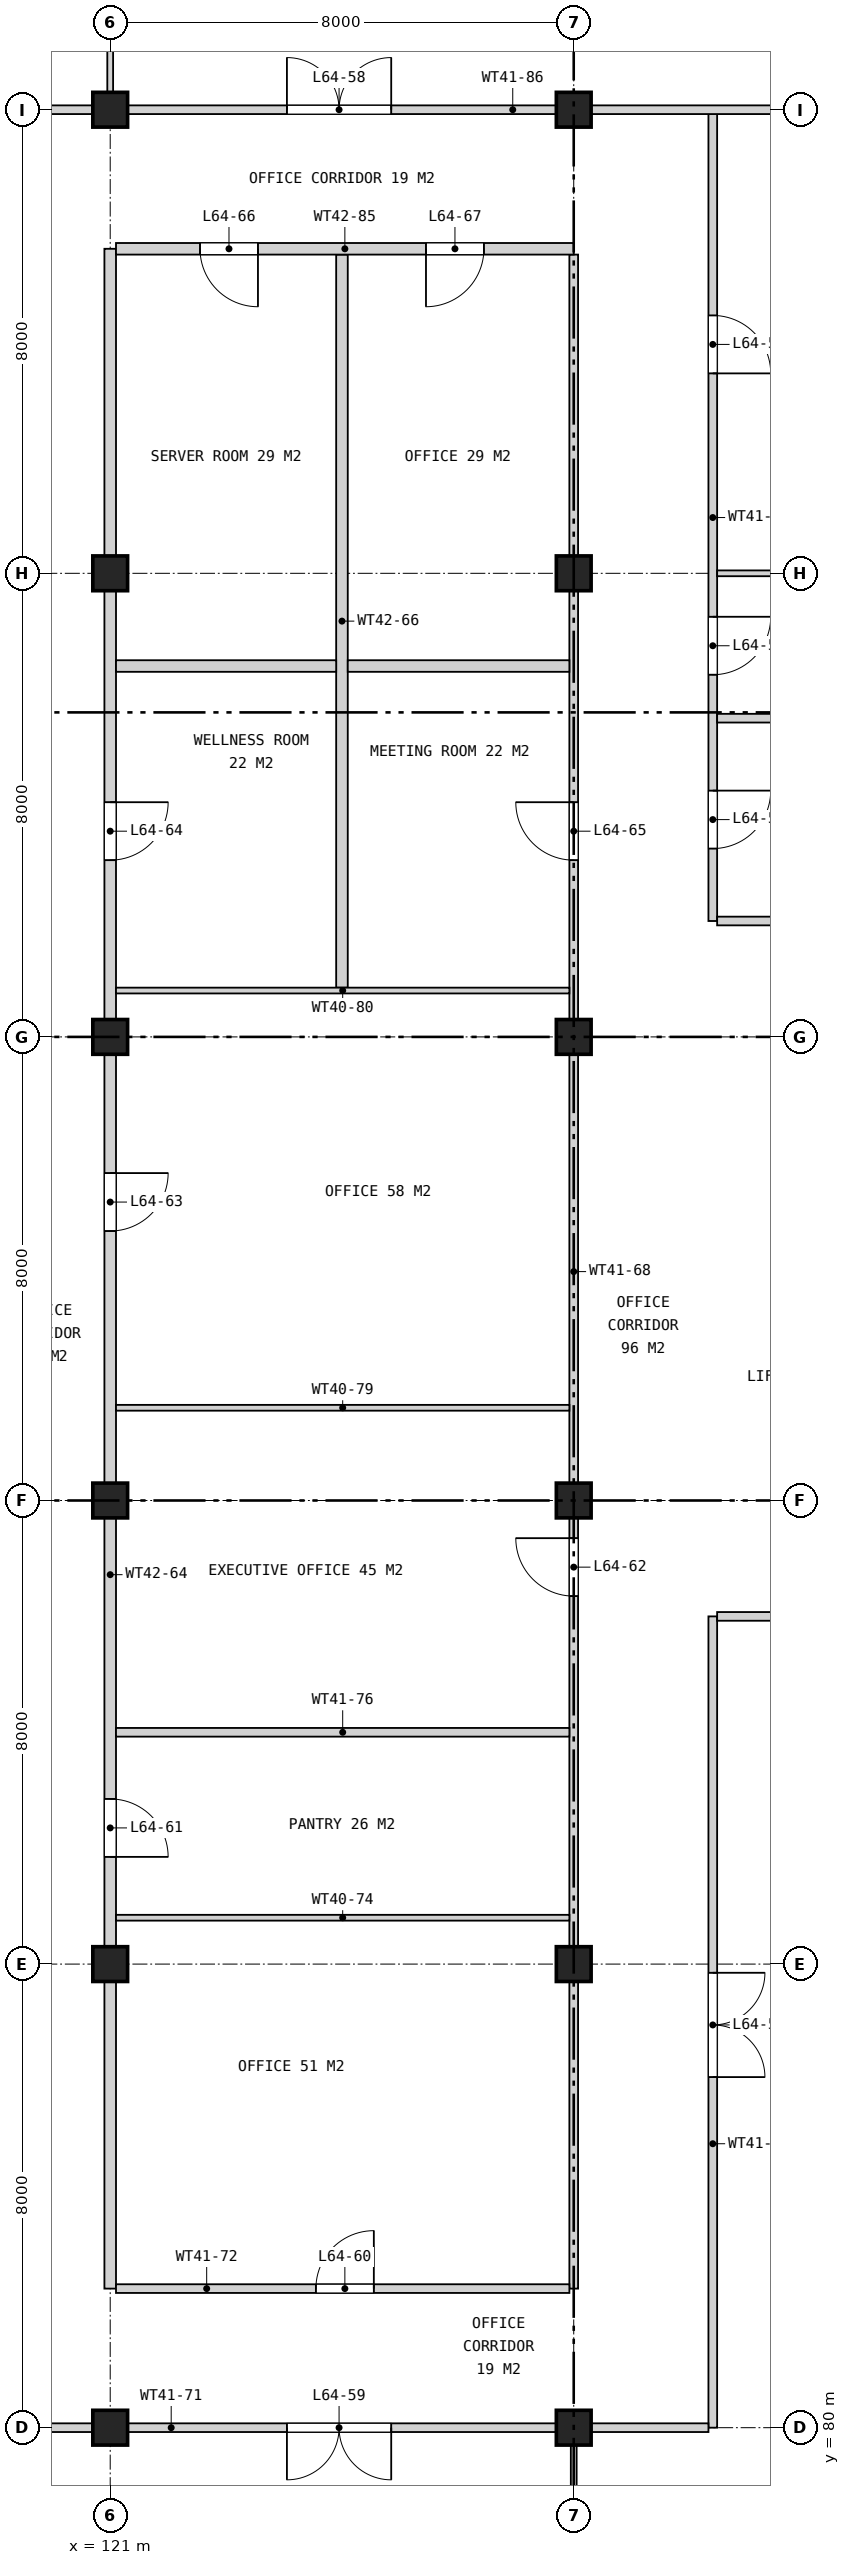
"""IFC4 building model, lengths in metres.
Left out: names, types, materials, properties, quantities, classifications, styles, units other than length and angle.
Written with IfcOpenShell. Run it as: python <this file> out.ifc"""

import sys

from ifc_helpers import new_model, si_unit, direction, frame, frame_2d, origin, origin_2d, place, context, subcontext, project, spatial, rectangle, extrude, element, fill, save


model = new_model("IFC4")
c1 = context("Model", 3, precision=1e-05, world=origin(), true_north=direction((0.0, 1.0)))
c2 = subcontext(c1, "Body", "Model", "MODEL_VIEW")
j1 = project(units=[si_unit("LENGTHUNIT", "METRE"), si_unit("PLANEANGLEUNIT", "RADIAN")], contexts=[c1])
p1 = place(None, origin())
s1 = spatial("IfcSite", under=j1, at=p1, CompositionType="ELEMENT")
p2 = place(p1, origin())
s2 = spatial("IfcBuilding", under=s1, at=p2, CompositionType="ELEMENT")
p3 = place(p2, frame((0.0, 0.0, 295.5)))
s3 = spatial("IfcBuildingStorey", under=s2, at=p3, CompositionType="ELEMENT", Elevation=295.5)
for number, where, z_axis, x_axis in (
    (1, (121.0, 80.0, 0.0), (0.0, 0.0, 1.0), (1.0, 0.0, 0.0)),
    (2, (121.0, 88.0, 0.0), (0.0, 0.0, 1.0), (1.0, 0.0, 0.0)),
    (3, (121.0, 96.0, 0.0), (0.0, 0.0, 1.0), (1.0, 0.0, 0.0)),
    (4, (121.0, 104.0, 0.0), (0.0, 0.0, 1.0), (1.0, 0.0, 0.0)),
    (5, (121.0, 112.0, 0.0), (0.0, 0.0, 1.0), (1.0, 0.0, 0.0)),
    (6, (121.0, 120.0, 0.0), (0.0, 0.0, 1.0), (1.0, 0.0, 0.0)),
    (7, (129.0, 80.0, 0.0), (0.0, 0.0, 1.0), (1.0, 0.0, 0.0)),
    (8, (129.0, 88.0, 0.0), (0.0, 0.0, 1.0), (1.0, 0.0, 0.0)),
    (9, (129.0, 96.0, 0.0), (0.0, 0.0, 1.0), (1.0, 0.0, 0.0)),
    (10, (129.0, 104.0, 0.0), (0.0, 0.0, 1.0), (1.0, 0.0, 0.0)),
    (11, (129.0, 112.0, 0.0), (0.0, 0.0, 1.0), (1.0, 0.0, 0.0)),
    (12, (129.0, 120.0, 0.0), (0.0, 0.0, 1.0), (1.0, 0.0, 0.0)),
):
    element("IfcColumn", number, at=place(p3, frame(where, z_axis=z_axis, x_axis=x_axis)), inside=s3, PredefinedType="COLUMN", context=c2, shape_type="SweptSolid", body=[
        extrude(rectangle(XDim=0.6, YDim=0.6, at=origin_2d()), origin(), (0.0, 0.0, 1.0), 4.2),
    ])
p4 = place(p3, frame((121.0, 82.4, 0.0), z_axis=(0.0, 0.0, 1.0), x_axis=(0.0, 1.0, 0.0)))
e13 = element("IfcWall", 13, at=p4, inside=s3, PredefinedType="SOLIDWALL", context=c2, shape_type="SweptSolid", body=[
    extrude(rectangle(XDim=35.2, YDim=0.2, at=frame_2d((17.6, 0.0))), origin(), (0.0, 0.0, 1.0), 3.443),
])
p5 = place(p4, frame((7.45, 0.0, 0.0)))
e14 = element("IfcOpeningElement", 14, at=p5, cuts=e13, PredefinedType="OPENING", context=c2, shape_type="SweptSolid", body=[
    extrude(rectangle(XDim=1.0, YDim=2.1, at=frame_2d((0.5, 1.05))), frame((0.0, 0.11, 0.0), z_axis=(0.0, -1.0, 0.0), x_axis=(1.0, 0.0, 0.0)), (0.0, 0.0, 1.0), 0.22),
])
p6 = place(p4, frame((18.25, 0.0, 0.0)))
e15 = element("IfcOpeningElement", 15, at=p6, cuts=e13, PredefinedType="OPENING", context=c2, shape_type="SweptSolid", body=[
    extrude(rectangle(XDim=1.0, YDim=2.1, at=frame_2d((0.5, 1.05))), frame((0.0, 0.11, 0.0), z_axis=(0.0, -1.0, 0.0), x_axis=(1.0, 0.0, 0.0)), (0.0, 0.0, 1.0), 0.22),
])
p7 = place(p4, frame((24.65, 0.0, 0.0)))
e16 = element("IfcOpeningElement", 16, at=p7, cuts=e13, PredefinedType="OPENING", context=c2, shape_type="SweptSolid", body=[
    extrude(rectangle(XDim=1.0, YDim=2.1, at=frame_2d((0.5, 1.05))), frame((0.0, 0.11, 0.0), z_axis=(0.0, -1.0, 0.0), x_axis=(1.0, 0.0, 0.0)), (0.0, 0.0, 1.0), 0.22),
])
p8 = place(p3, frame((121.0, 120.075, 0.0), z_axis=(0.0, 0.0, 1.0), x_axis=(0.0, 1.0, 0.0)))
e17 = element("IfcWall", 17, at=p8, inside=s3, PredefinedType="PARTITIONING", context=c2, shape_type="SweptSolid", body=[
    extrude(rectangle(XDim=8.145, YDim=0.1, at=frame_2d((4.073, 0.0))), origin(), (0.0, 0.0, 1.0), 3.443),
])
p9 = place(p3, frame((125.0, 104.85, 0.0), z_axis=(0.0, 0.0, 1.0), x_axis=(0.0, 1.0, 0.0)))
e18 = element("IfcWall", 18, at=p9, inside=s3, PredefinedType="SOLIDWALL", context=c2, shape_type="SweptSolid", body=[
    extrude(rectangle(XDim=12.65, YDim=0.2, at=frame_2d((6.325, 0.0))), origin(), (0.0, 0.0, 1.0), 3.443),
])
p10 = place(p3, frame((129.0, 71.78, 0.0), z_axis=(0.0, 0.0, 1.0), x_axis=(0.0, 1.0, 0.0)))
e19 = element("IfcWall", 19, at=p10, inside=s3, PredefinedType="PARTITIONING", context=c2, shape_type="SweptSolid", body=[
    extrude(rectangle(XDim=8.145, YDim=0.1, at=frame_2d((4.073, 0.0))), origin(), (0.0, 0.0, 1.0), 3.443),
])
p11 = place(p3, frame((129.0, 82.4, 0.0), z_axis=(0.0, 0.0, 1.0), x_axis=(0.0, 1.0, 0.0)))
e20 = element("IfcWall", 20, at=p11, inside=s3, PredefinedType="PARTITIONING", context=c2, shape_type="SweptSolid", body=[
    extrude(rectangle(XDim=35.1, YDim=0.15, at=frame_2d((17.55, 0.0))), origin(), (0.0, 0.0, 1.0), 3.443),
])
p12 = place(p11, frame((11.95, 0.0, 0.0)))
e21 = element("IfcOpeningElement", 21, at=p12, cuts=e20, PredefinedType="OPENING", context=c2, shape_type="SweptSolid", body=[
    extrude(rectangle(XDim=1.0, YDim=2.1, at=frame_2d((0.5, 1.05))), frame((0.0, 0.085, 0.0), z_axis=(0.0, -1.0, 0.0), x_axis=(1.0, 0.0, 0.0)), (0.0, 0.0, 1.0), 0.17),
])
p13 = place(p11, frame((24.65, 0.0, 0.0)))
e22 = element("IfcOpeningElement", 22, at=p13, cuts=e20, PredefinedType="OPENING", context=c2, shape_type="SweptSolid", body=[
    extrude(rectangle(XDim=1.0, YDim=2.1, at=frame_2d((0.5, 1.05))), frame((0.0, 0.085, 0.0), z_axis=(0.0, -1.0, 0.0), x_axis=(1.0, 0.0, 0.0)), (0.0, 0.0, 1.0), 0.17),
])
p14 = place(p3, frame((131.4, 80.0, 0.0), z_axis=(0.0, 0.0, 1.0), x_axis=(0.0, 1.0, 0.0)))
e23 = element("IfcWall", 23, at=p14, inside=s3, PredefinedType="PARTITIONING", context=c2, shape_type="SweptSolid", body=[
    extrude(rectangle(XDim=14.0, YDim=0.15, at=frame_2d((7.0, 0.0))), origin(), (0.0, 0.0, 1.0), 3.443),
])
p15 = place(p14, frame((6.05, 0.0, 0.0)))
e24 = element("IfcOpeningElement", 24, at=p15, cuts=e23, PredefinedType="OPENING", context=c2, shape_type="SweptSolid", body=[
    extrude(rectangle(XDim=1.8, YDim=2.1, at=frame_2d((0.9, 1.05))), frame((0.0, 0.085, 0.0), z_axis=(0.0, -1.0, 0.0), x_axis=(1.0, 0.0, 0.0)), (0.0, 0.0, 1.0), 0.17),
])
p16 = place(p3, frame((131.4, 106.0, 0.0), z_axis=(0.0, 0.0, 1.0), x_axis=(0.0, 1.0, 0.0)))
e25 = element("IfcWall", 25, at=p16, inside=s3, PredefinedType="PARTITIONING", context=c2, shape_type="SweptSolid", body=[
    extrude(rectangle(XDim=13.925, YDim=0.15, at=frame_2d((6.962, 0.0))), origin(), (0.0, 0.0, 1.0), 3.443),
])
p17 = place(p16, frame((1.25, 0.0, 0.0)))
e26 = element("IfcOpeningElement", 26, at=p17, cuts=e25, PredefinedType="OPENING", context=c2, shape_type="SweptSolid", body=[
    extrude(rectangle(XDim=1.0, YDim=2.1, at=frame_2d((0.5, 1.05))), frame((0.0, 0.085, 0.0), z_axis=(0.0, -1.0, 0.0), x_axis=(1.0, 0.0, 0.0)), (0.0, 0.0, 1.0), 0.17),
])
p18 = place(p16, frame((4.25, 0.0, 0.0)))
e27 = element("IfcOpeningElement", 27, at=p18, cuts=e25, PredefinedType="OPENING", context=c2, shape_type="SweptSolid", body=[
    extrude(rectangle(XDim=1.0, YDim=2.1, at=frame_2d((0.5, 1.05))), frame((0.0, 0.085, 0.0), z_axis=(0.0, -1.0, 0.0), x_axis=(1.0, 0.0, 0.0)), (0.0, 0.0, 1.0), 0.17),
])
p19 = place(p16, frame((9.45, 0.0, 0.0)))
e28 = element("IfcOpeningElement", 28, at=p19, cuts=e25, PredefinedType="OPENING", context=c2, shape_type="SweptSolid", body=[
    extrude(rectangle(XDim=1.0, YDim=2.1, at=frame_2d((0.5, 1.05))), frame((0.0, 0.085, 0.0), z_axis=(0.0, -1.0, 0.0), x_axis=(1.0, 0.0, 0.0)), (0.0, 0.0, 1.0), 0.17),
])
p20 = place(p3, frame((112.78, 80.0, 0.0), z_axis=(0.0, 0.0, 1.0), x_axis=(1.0, 0.0, 0.0)))
e29 = element("IfcWall", 29, at=p20, inside=s3, PredefinedType="PARTITIONING", context=c2, shape_type="SweptSolid", body=[
    extrude(rectangle(XDim=18.545, YDim=0.15, at=frame_2d((9.272, 0.0))), origin(), (0.0, 0.0, 1.0), 3.443),
])
p21 = place(p20, frame((11.27, 0.0, 0.0)))
e30 = element("IfcOpeningElement", 30, at=p21, cuts=e29, PredefinedType="OPENING", context=c2, shape_type="SweptSolid", body=[
    extrude(rectangle(XDim=1.8, YDim=2.1, at=frame_2d((0.9, 1.05))), frame((0.0, 0.085, 0.0), z_axis=(0.0, -1.0, 0.0), x_axis=(1.0, 0.0, 0.0)), (0.0, 0.0, 1.0), 0.17),
])
p22 = place(p3, frame((121.1, 82.4, 0.0), z_axis=(0.0, 0.0, 1.0), x_axis=(1.0, 0.0, 0.0)))
e31 = element("IfcWall", 31, at=p22, inside=s3, PredefinedType="PARTITIONING", context=c2, shape_type="SweptSolid", body=[
    extrude(rectangle(XDim=7.825, YDim=0.15, at=frame_2d((3.913, 0.0))), origin(), (0.0, 0.0, 1.0), 3.443),
])
p23 = place(p22, frame((3.45, 0.0, 0.0)))
e32 = element("IfcOpeningElement", 32, at=p23, cuts=e31, PredefinedType="OPENING", context=c2, shape_type="SweptSolid", body=[
    extrude(rectangle(XDim=1.0, YDim=2.1, at=frame_2d((0.5, 1.05))), frame((0.0, 0.085, 0.0), z_axis=(0.0, -1.0, 0.0), x_axis=(1.0, 0.0, 0.0)), (0.0, 0.0, 1.0), 0.17),
])
p24 = place(p3, frame((121.1, 88.8, 0.0), z_axis=(0.0, 0.0, 1.0), x_axis=(1.0, 0.0, 0.0)))
e33 = element("IfcWall", 33, at=p24, inside=s3, PredefinedType="PARTITIONING", context=c2, shape_type="SweptSolid", body=[
    extrude(rectangle(XDim=7.825, YDim=0.1, at=frame_2d((3.913, 0.0))), origin(), (0.0, 0.0, 1.0), 3.443),
])
p25 = place(p3, frame((121.1, 92.0, 0.0), z_axis=(0.0, 0.0, 1.0), x_axis=(1.0, 0.0, 0.0)))
e34 = element("IfcWall", 34, at=p25, inside=s3, PredefinedType="PARTITIONING", context=c2, shape_type="SweptSolid", body=[
    extrude(rectangle(XDim=7.825, YDim=0.15, at=frame_2d((3.913, 0.0))), origin(), (0.0, 0.0, 1.0), 3.443),
])
p26 = place(p3, frame((131.475, 94.0, 0.0), z_axis=(0.0, 0.0, 1.0), x_axis=(1.0, 0.0, 0.0)))
e35 = element("IfcWall", 35, at=p26, inside=s3, PredefinedType="PARTITIONING", context=c2, shape_type="SweptSolid", body=[
    extrude(rectangle(XDim=5.525, YDim=0.15, at=frame_2d((2.762, 0.0))), origin(), (0.0, 0.0, 1.0), 3.443),
])
for number, where, z_axis, x_axis in (
    (36, (121.1, 97.6, 0.0), (0.0, 0.0, 1.0), (1.0, 0.0, 0.0)),
    (37, (121.1, 104.8, 0.0), (0.0, 0.0, 1.0), (1.0, 0.0, 0.0)),
):
    element("IfcWall", number, at=place(p3, frame(where, z_axis=z_axis, x_axis=x_axis)), inside=s3, PredefinedType="PARTITIONING", context=c2, shape_type="SweptSolid", body=[
        extrude(rectangle(XDim=7.825, YDim=0.1, at=frame_2d((3.913, 0.0))), origin(), (0.0, 0.0, 1.0), 3.443),
    ])
for number, where, z_axis, x_axis in (
    (38, (131.475, 106.0, 0.0), (0.0, 0.0, 1.0), (1.0, 0.0, 0.0)),
    (39, (131.475, 109.5, 0.0), (0.0, 0.0, 1.0), (1.0, 0.0, 0.0)),
):
    element("IfcWall", number, at=place(p3, frame(where, z_axis=z_axis, x_axis=x_axis)), inside=s3, PredefinedType="PARTITIONING", context=c2, shape_type="SweptSolid", body=[
        extrude(rectangle(XDim=5.525, YDim=0.15, at=frame_2d((2.762, 0.0))), origin(), (0.0, 0.0, 1.0), 3.443),
    ])
p27 = place(p3, frame((131.475, 112.0, 0.0), z_axis=(0.0, 0.0, 1.0), x_axis=(1.0, 0.0, 0.0)))
e40 = element("IfcWall", 40, at=p27, inside=s3, PredefinedType="PARTITIONING", context=c2, shape_type="SweptSolid", body=[
    extrude(rectangle(XDim=5.525, YDim=0.1, at=frame_2d((2.762, 0.0))), origin(), (0.0, 0.0, 1.0), 3.443),
])
p28 = place(p3, frame((121.1, 117.6, 0.0), z_axis=(0.0, 0.0, 1.0), x_axis=(1.0, 0.0, 0.0)))
e41 = element("IfcWall", 41, at=p28, inside=s3, PredefinedType="SOLIDWALL", context=c2, shape_type="SweptSolid", body=[
    extrude(rectangle(XDim=7.9, YDim=0.2, at=frame_2d((3.95, 0.0))), origin(), (0.0, 0.0, 1.0), 3.443),
])
p29 = place(p28, frame((1.45, 0.0, 0.0)))
e42 = element("IfcOpeningElement", 42, at=p29, cuts=e41, PredefinedType="OPENING", context=c2, shape_type="SweptSolid", body=[
    extrude(rectangle(XDim=1.0, YDim=2.1, at=frame_2d((0.5, 1.05))), frame((0.0, 0.11, 0.0), z_axis=(0.0, -1.0, 0.0), x_axis=(1.0, 0.0, 0.0)), (0.0, 0.0, 1.0), 0.22),
])
p30 = place(p28, frame((5.35, 0.0, 0.0)))
e43 = element("IfcOpeningElement", 43, at=p30, cuts=e41, PredefinedType="OPENING", context=c2, shape_type="SweptSolid", body=[
    extrude(rectangle(XDim=1.0, YDim=2.1, at=frame_2d((0.5, 1.05))), frame((0.0, 0.11, 0.0), z_axis=(0.0, -1.0, 0.0), x_axis=(1.0, 0.0, 0.0)), (0.0, 0.0, 1.0), 0.22),
])
p31 = place(p3, frame((118.675, 120.0, 0.0), z_axis=(0.0, 0.0, 1.0), x_axis=(1.0, 0.0, 0.0)))
e44 = element("IfcWall", 44, at=p31, inside=s3, PredefinedType="PARTITIONING", context=c2, shape_type="SweptSolid", body=[
    extrude(rectangle(XDim=18.545, YDim=0.15, at=frame_2d((9.272, 0.0))), origin(), (0.0, 0.0, 1.0), 3.443),
])
p32 = place(p31, frame((5.375, 0.0, 0.0)))
e45 = element("IfcOpeningElement", 45, at=p32, cuts=e44, PredefinedType="OPENING", context=c2, shape_type="SweptSolid", body=[
    extrude(rectangle(XDim=1.8, YDim=2.1, at=frame_2d((0.9, 1.05))), frame((0.0, 0.085, 0.0), z_axis=(0.0, -1.0, 0.0), x_axis=(1.0, 0.0, 0.0)), (0.0, 0.0, 1.0), 0.17),
])
p33 = place(p3, frame((121.1, 110.4, 0.0), z_axis=(0.0, 0.0, 1.0), x_axis=(1.0, 0.0, 0.0)))
e46 = element("IfcWall", 46, at=p33, inside=s3, PredefinedType="SOLIDWALL", context=c2, shape_type="SweptSolid", body=[
    extrude(rectangle(XDim=3.8, YDim=0.2, at=frame_2d((1.9, 0.0))), origin(), (0.0, 0.0, 1.0), 3.443),
])
p34 = place(p3, frame((125.1, 110.4, 0.0), z_axis=(0.0, 0.0, 1.0), x_axis=(1.0, 0.0, 0.0)))
e47 = element("IfcWall", 47, at=p34, inside=s3, PredefinedType="SOLIDWALL", context=c2, shape_type="SweptSolid", body=[
    extrude(rectangle(XDim=3.825, YDim=0.2, at=frame_2d((1.913, 0.0))), origin(), (0.0, 0.0, 1.0), 3.443),
])
p35 = place(p17, frame((1.0, 0.0, 0.0), z_axis=(0.0, 0.0, 1.0), x_axis=(-1.0, 0.0, 0.0)))
e48 = element("IfcDoor", 48, at=p35, inside=s3, OperationType="SINGLE_SWING_LEFT", PredefinedType="DOOR", context=c2, shape_type="SweptSolid", body=[
    extrude(rectangle(XDim=1.0, YDim=2.1, at=frame_2d((0.5, 1.05))), frame((0.0, 0.025, 0.0), z_axis=(0.0, -1.0, 0.0), x_axis=(1.0, 0.0, 0.0)), (0.0, 0.0, 1.0), 0.05),
])
fill(e26, e48)
p36 = place(p18, frame((1.0, 0.0, 0.0), z_axis=(0.0, 0.0, 1.0), x_axis=(-1.0, 0.0, 0.0)))
e49 = element("IfcDoor", 49, at=p36, inside=s3, OperationType="SINGLE_SWING_LEFT", PredefinedType="DOOR", context=c2, shape_type="SweptSolid", body=[
    extrude(rectangle(XDim=1.0, YDim=2.1, at=frame_2d((0.5, 1.05))), frame((0.0, 0.025, 0.0), z_axis=(0.0, -1.0, 0.0), x_axis=(1.0, 0.0, 0.0)), (0.0, 0.0, 1.0), 0.05),
])
fill(e27, e49)
p37 = place(p19, frame((1.0, 0.0, 0.0), z_axis=(0.0, 0.0, 1.0), x_axis=(-1.0, 0.0, 0.0)))
e50 = element("IfcDoor", 50, at=p37, inside=s3, OperationType="SINGLE_SWING_RIGHT", PredefinedType="DOOR", context=c2, shape_type="SweptSolid", body=[
    extrude(rectangle(XDim=1.0, YDim=2.1, at=frame_2d((0.5, 1.05))), frame((0.0, 0.025, 0.0), z_axis=(0.0, -1.0, 0.0), x_axis=(1.0, 0.0, 0.0)), (0.0, 0.0, 1.0), 0.05),
])
fill(e28, e50)
p38 = place(p15, frame((1.8, 0.0, 0.0), z_axis=(0.0, 0.0, 1.0), x_axis=(-1.0, 0.0, 0.0)))
e51 = element("IfcDoor", 51, at=p38, inside=s3, OperationType="DOUBLE_DOOR_SINGLE_SWING", PredefinedType="DOOR", context=c2, shape_type="SweptSolid", body=[
    extrude(rectangle(XDim=1.8, YDim=2.1, at=frame_2d((0.9, 1.05))), frame((0.0, 0.025, 0.0), z_axis=(0.0, -1.0, 0.0), x_axis=(1.0, 0.0, 0.0)), (0.0, 0.0, 1.0), 0.05),
])
fill(e24, e51)
p39 = place(p32, origin())
e52 = element("IfcDoor", 52, at=p39, inside=s3, OperationType="DOUBLE_DOOR_SINGLE_SWING", PredefinedType="DOOR", context=c2, shape_type="SweptSolid", body=[
    extrude(rectangle(XDim=1.8, YDim=2.1, at=frame_2d((0.9, 1.05))), frame((0.0, 0.025, 0.0), z_axis=(0.0, -1.0, 0.0), x_axis=(1.0, 0.0, 0.0)), (0.0, 0.0, 1.0), 0.05),
])
fill(e45, e52)
p40 = place(p21, frame((1.8, 0.0, 0.0), z_axis=(0.0, 0.0, 1.0), x_axis=(-1.0, 0.0, 0.0)))
e53 = element("IfcDoor", 53, at=p40, inside=s3, OperationType="DOUBLE_DOOR_SINGLE_SWING", PredefinedType="DOOR", context=c2, shape_type="SweptSolid", body=[
    extrude(rectangle(XDim=1.8, YDim=2.1, at=frame_2d((0.9, 1.05))), frame((0.0, 0.025, 0.0), z_axis=(0.0, -1.0, 0.0), x_axis=(1.0, 0.0, 0.0)), (0.0, 0.0, 1.0), 0.05),
])
fill(e30, e53)
p41 = place(p23, origin())
e54 = element("IfcDoor", 54, at=p41, inside=s3, OperationType="SINGLE_SWING_RIGHT", PredefinedType="DOOR", context=c2, shape_type="SweptSolid", body=[
    extrude(rectangle(XDim=1.0, YDim=2.1, at=frame_2d((0.5, 1.05))), frame((0.0, 0.025, 0.0), z_axis=(0.0, -1.0, 0.0), x_axis=(1.0, 0.0, 0.0)), (0.0, 0.0, 1.0), 0.05),
])
fill(e32, e54)
p42 = place(p5, frame((1.0, 0.0, 0.0), z_axis=(0.0, 0.0, 1.0), x_axis=(-1.0, 0.0, 0.0)))
e55 = element("IfcDoor", 55, at=p42, inside=s3, OperationType="SINGLE_SWING_RIGHT", PredefinedType="DOOR", context=c2, shape_type="SweptSolid", body=[
    extrude(rectangle(XDim=1.0, YDim=2.1, at=frame_2d((0.5, 1.05))), frame((0.0, 0.025, 0.0), z_axis=(0.0, -1.0, 0.0), x_axis=(1.0, 0.0, 0.0)), (0.0, 0.0, 1.0), 0.05),
])
fill(e14, e55)
p43 = place(p12, origin())
e56 = element("IfcDoor", 56, at=p43, inside=s3, OperationType="SINGLE_SWING_RIGHT", PredefinedType="DOOR", context=c2, shape_type="SweptSolid", body=[
    extrude(rectangle(XDim=1.0, YDim=2.1, at=frame_2d((0.5, 1.05))), frame((0.0, 0.025, 0.0), z_axis=(0.0, -1.0, 0.0), x_axis=(1.0, 0.0, 0.0)), (0.0, 0.0, 1.0), 0.05),
])
fill(e21, e56)
p44 = place(p6, frame((1.0, 0.0, 0.0), z_axis=(0.0, 0.0, 1.0), x_axis=(-1.0, 0.0, 0.0)))
e57 = element("IfcDoor", 57, at=p44, inside=s3, OperationType="SINGLE_SWING_LEFT", PredefinedType="DOOR", context=c2, shape_type="SweptSolid", body=[
    extrude(rectangle(XDim=1.0, YDim=2.1, at=frame_2d((0.5, 1.05))), frame((0.0, 0.025, 0.0), z_axis=(0.0, -1.0, 0.0), x_axis=(1.0, 0.0, 0.0)), (0.0, 0.0, 1.0), 0.05),
])
fill(e15, e57)
p45 = place(p7, frame((1.0, 0.0, 0.0), z_axis=(0.0, 0.0, 1.0), x_axis=(-1.0, 0.0, 0.0)))
e58 = element("IfcDoor", 58, at=p45, inside=s3, OperationType="SINGLE_SWING_LEFT", PredefinedType="DOOR", context=c2, shape_type="SweptSolid", body=[
    extrude(rectangle(XDim=1.0, YDim=2.1, at=frame_2d((0.5, 1.05))), frame((0.0, 0.025, 0.0), z_axis=(0.0, -1.0, 0.0), x_axis=(1.0, 0.0, 0.0)), (0.0, 0.0, 1.0), 0.05),
])
fill(e16, e58)
p46 = place(p13, origin())
e59 = element("IfcDoor", 59, at=p46, inside=s3, OperationType="SINGLE_SWING_RIGHT", PredefinedType="DOOR", context=c2, shape_type="SweptSolid", body=[
    extrude(rectangle(XDim=1.0, YDim=2.1, at=frame_2d((0.5, 1.05))), frame((0.0, 0.025, 0.0), z_axis=(0.0, -1.0, 0.0), x_axis=(1.0, 0.0, 0.0)), (0.0, 0.0, 1.0), 0.05),
])
fill(e22, e59)
p47 = place(p29, frame((1.0, 0.0, 0.0), z_axis=(0.0, 0.0, 1.0), x_axis=(-1.0, 0.0, 0.0)))
e60 = element("IfcDoor", 60, at=p47, inside=s3, OperationType="SINGLE_SWING_LEFT", PredefinedType="DOOR", context=c2, shape_type="SweptSolid", body=[
    extrude(rectangle(XDim=1.0, YDim=2.1, at=frame_2d((0.5, 1.05))), frame((0.0, 0.025, 0.0), z_axis=(0.0, -1.0, 0.0), x_axis=(1.0, 0.0, 0.0)), (0.0, 0.0, 1.0), 0.05),
])
fill(e42, e60)
p48 = place(p30, frame((1.0, 0.0, 0.0), z_axis=(0.0, 0.0, 1.0), x_axis=(-1.0, 0.0, 0.0)))
e61 = element("IfcDoor", 61, at=p48, inside=s3, OperationType="SINGLE_SWING_RIGHT", PredefinedType="DOOR", context=c2, shape_type="SweptSolid", body=[
    extrude(rectangle(XDim=1.0, YDim=2.1, at=frame_2d((0.5, 1.05))), frame((0.0, 0.025, 0.0), z_axis=(0.0, -1.0, 0.0), x_axis=(1.0, 0.0, 0.0)), (0.0, 0.0, 1.0), 0.05),
])
fill(e43, e61)
save(model, sys.argv[1])
